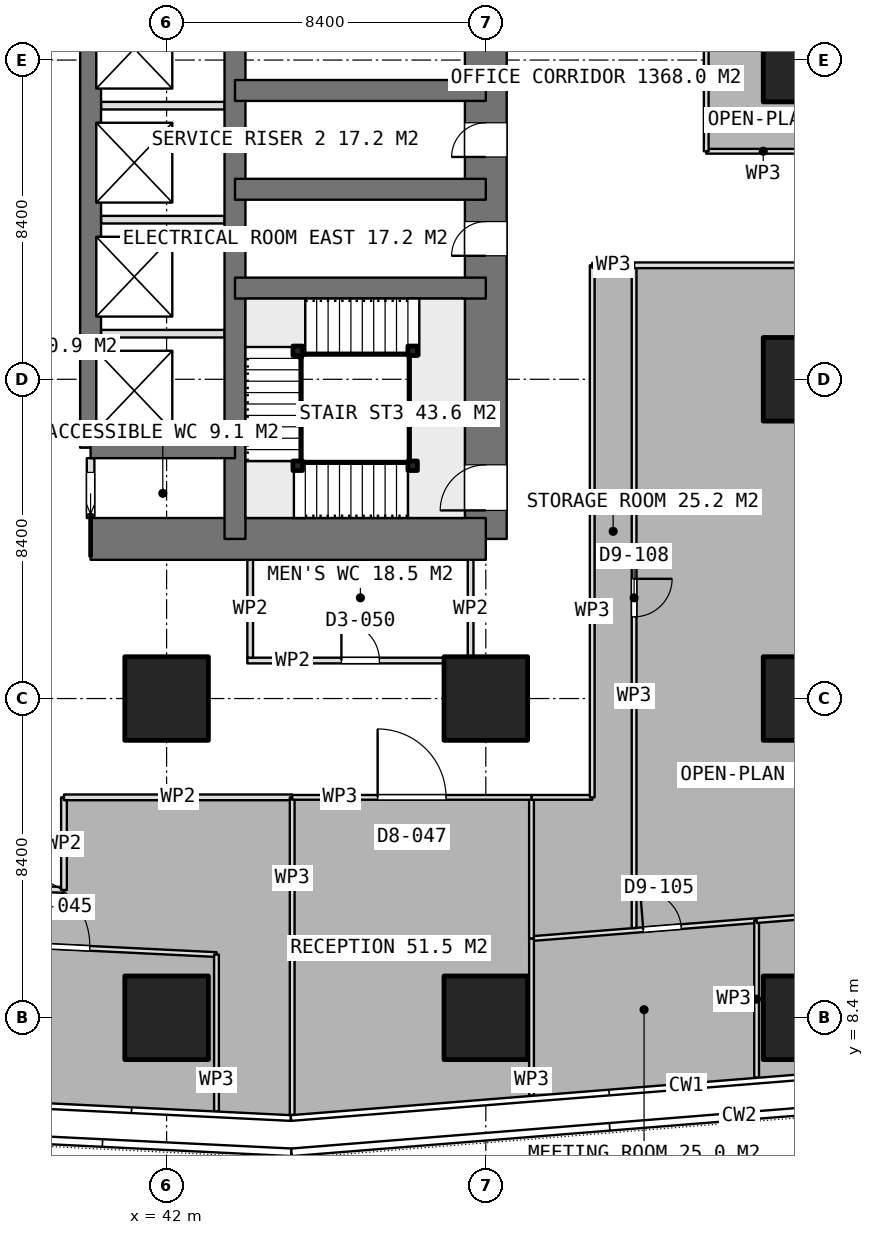
"""IFC4 building model, lengths in metres.
Left out: names, types, materials, properties, quantities, classifications, styles, units other than length and angle.
Written with IfcOpenShell. Run it as: python <this file> out.ifc"""

import sys

from ifc_helpers import new_model, si_unit, direction, frame, frame_2d, origin, origin_2d, place, context, subcontext, project, spatial, rectangle, extrude, element, fill, save


model = new_model("IFC4")
c1 = context("Model", 3, precision=1e-05, world=origin(), true_north=direction((0.0, 1.0)))
c2 = subcontext(c1, "Body", "Model", "MODEL_VIEW")
j1 = project(units=[si_unit("LENGTHUNIT", "METRE"), si_unit("PLANEANGLEUNIT", "RADIAN")], contexts=[c1])
p1 = place(None, origin())
s1 = spatial("IfcSite", under=j1, at=p1, CompositionType="ELEMENT")
p2 = place(p1, origin())
s2 = spatial("IfcBuilding", under=s1, at=p2, CompositionType="ELEMENT")
p3 = place(p2, frame((0.0, 0.0, 44.15)))
s3 = spatial("IfcBuildingStorey", under=s2, at=p3, CompositionType="ELEMENT", Elevation=44.15)
p4 = place(p3, frame((40.0, 21.0, 0.0), z_axis=(0.0, 0.0, 1.0), x_axis=(1.0, 0.0, 0.0)))
e1 = element("IfcWall", 1, at=p4, inside=s3, PredefinedType="SHEAR", context=c2, shape_type="SweptSolid", body=[
    extrude(rectangle(XDim=10.4, YDim=1.1, at=frame_2d((5.2, 0.0))), origin(), (0.0, 0.0, 1.0), 3.75),
])
p5 = place(p3, frame((50.4, 21.0, 0.0), z_axis=(0.0, 0.0, 1.0), x_axis=(0.0, 1.0, 0.0)))
e2 = element("IfcWall", 2, at=p5, inside=s3, PredefinedType="SHEAR", context=c2, shape_type="SweptSolid", body=[
    extrude(rectangle(XDim=25.2, YDim=1.1, at=frame_2d((12.6, 0.0))), origin(), (0.0, 0.0, 1.0), 3.75),
])
p6 = place(p5, frame((16.2, 0.0, 0.0)))
e3 = element("IfcOpeningElement", 3, at=p6, cuts=e2, PredefinedType="OPENING", context=c2, shape_type="SweptSolid", body=[
    extrude(rectangle(XDim=1.2, YDim=2.1, at=frame_2d((0.6, 1.05))), frame((0.0, 0.56, 0.0), z_axis=(0.0, -1.0, 0.0), x_axis=(1.0, 0.0, 0.0)), (0.0, 0.0, 1.0), 1.12),
])
p7 = place(p5, frame((10.05, 0.0, 0.0)))
e4 = element("IfcOpeningElement", 4, at=p7, cuts=e2, PredefinedType="OPENING", context=c2, shape_type="SweptSolid", body=[
    extrude(rectangle(XDim=0.9, YDim=2.1, at=frame_2d((0.45, 1.05))), frame((0.0, 0.56, 0.0), z_axis=(0.0, -1.0, 0.0), x_axis=(1.0, 0.0, 0.0)), (0.0, 0.0, 1.0), 1.12),
])
p8 = place(p5, frame((7.45, 0.0, 0.0)))
e5 = element("IfcOpeningElement", 5, at=p8, cuts=e2, PredefinedType="OPENING", context=c2, shape_type="SweptSolid", body=[
    extrude(rectangle(XDim=0.9, YDim=2.1, at=frame_2d((0.45, 1.05))), frame((0.0, 0.56, 0.0), z_axis=(0.0, -1.0, 0.0), x_axis=(1.0, 0.0, 0.0)), (0.0, 0.0, 1.0), 1.12),
])
p9 = place(p5, frame((0.75, 0.0, 0.0)))
e6 = element("IfcOpeningElement", 6, at=p9, cuts=e2, PredefinedType="OPENING", context=c2, shape_type="SweptSolid", body=[
    extrude(rectangle(XDim=1.2, YDim=2.1, at=frame_2d((0.6, 1.05))), frame((0.0, 0.56, 0.0), z_axis=(0.0, -1.0, 0.0), x_axis=(1.0, 0.0, 0.0)), (0.0, 0.0, 1.0), 1.12),
])
p10 = place(p3, frame((43.8, 21.0, 0.0), z_axis=(0.0, 0.0, 1.0), x_axis=(0.0, 1.0, 0.0)))
e7 = element("IfcWall", 7, at=p10, inside=s3, PredefinedType="SHEAR", context=c2, shape_type="SweptSolid", body=[
    extrude(rectangle(XDim=25.2, YDim=0.55, at=frame_2d((12.6, 0.0))), origin(), (0.0, 0.0, 1.0), 3.75),
])
p11 = place(p3, frame((40.0, 23.4, 0.0), z_axis=(0.0, 0.0, 1.0), x_axis=(0.0, 1.0, 0.0)))
e8 = element("IfcWall", 8, at=p11, inside=s3, PredefinedType="SHEAR", context=c2, shape_type="SweptSolid", body=[
    extrude(rectangle(XDim=18.0, YDim=0.55, at=frame_2d((9.0, 0.0))), origin(), (0.0, 0.0, 1.0), 3.75),
])
p12 = place(p3, frame((40.0, 23.4, 0.0), z_axis=(0.0, 0.0, 1.0), x_axis=(1.0, 0.0, 0.0)))
e9 = element("IfcWall", 9, at=p12, inside=s3, PredefinedType="SHEAR", context=c2, shape_type="SweptSolid", body=[
    extrude(rectangle(XDim=3.8, YDim=0.55, at=frame_2d((1.9, 0.0))), origin(), (0.0, 0.0, 1.0), 3.75),
])
for number, where, z_axis, x_axis in (
    (10, (43.8, 27.6, 0.0), (0.0, 0.0, 1.0), (1.0, 0.0, 0.0)),
    (11, (43.8, 30.2, 0.0), (0.0, 0.0, 1.0), (1.0, 0.0, 0.0)),
    (12, (43.8, 32.8, 0.0), (0.0, 0.0, 1.0), (1.0, 0.0, 0.0)),
):
    element("IfcWall", number, at=place(p3, frame(where, z_axis=z_axis, x_axis=x_axis)), inside=s3, PredefinedType="SHEAR", context=c2, shape_type="SweptSolid", body=[
        extrude(rectangle(XDim=6.6, YDim=0.55, at=frame_2d((3.3, 0.0))), origin(), (0.0, 0.0, 1.0), 3.75),
    ])
for number, where, z_axis, x_axis in (
    (13, (42.0, 8.4, 0.0), (0.0, 0.0, 1.0), (1.0, 0.0, 0.0)),
    (14, (42.0, 16.8, 0.0), (0.0, 0.0, 1.0), (1.0, 0.0, 0.0)),
    (15, (50.4, 8.4, 0.0), (0.0, 0.0, 1.0), (1.0, 0.0, 0.0)),
    (16, (50.4, 16.8, 0.0), (0.0, 0.0, 1.0), (1.0, 0.0, 0.0)),
    (17, (58.8, 8.4, 0.0), (0.0, 0.0, 1.0), (1.0, 0.0, 0.0)),
    (18, (58.8, 16.8, 0.0), (0.0, 0.0, 1.0), (1.0, 0.0, 0.0)),
    (19, (58.8, 25.2, 0.0), (0.0, 0.0, 1.0), (1.0, 0.0, 0.0)),
    (20, (58.8, 33.6, 0.0), (0.0, 0.0, 1.0), (1.0, 0.0, 0.0)),
):
    element("IfcColumn", number, at=place(p3, frame(where, z_axis=z_axis, x_axis=x_axis)), inside=s3, PredefinedType="COLUMN", context=c2, shape_type="SweptSolid", body=[
        extrude(rectangle(XDim=2.2, YDim=2.2, at=origin_2d()), origin(), (0.0, 0.0, 1.0), 3.75),
    ])
for number, where, z_axis, x_axis in (
    (21, (40.275, 26.4, 0.0), (0.0, 0.0, 1.0), (1.0, 0.0, 0.0)),
    (22, (40.275, 29.4, 0.0), (0.0, 0.0, 1.0), (1.0, 0.0, 0.0)),
    (23, (40.275, 32.4, 0.0), (0.0, 0.0, 1.0), (1.0, 0.0, 0.0)),
):
    element("IfcWall", number, at=place(p3, frame(where, z_axis=z_axis, x_axis=x_axis)), inside=s3, PredefinedType="PARTITIONING", context=c2, shape_type="SweptSolid", body=[
        extrude(rectangle(XDim=3.25, YDim=0.2, at=frame_2d((1.625, 0.0))), origin(), (0.0, 0.0, 1.0), 3.5),
    ])
p13 = place(p3, frame((40.0, 21.55, 0.0), z_axis=(0.0, 0.0, 1.0), x_axis=(0.0, 1.0, 0.0)))
e24 = element("IfcWall", 24, at=p13, inside=s3, PredefinedType="PARTITIONING", context=c2, shape_type="SweptSolid", body=[
    extrude(rectangle(XDim=1.575, YDim=0.2, at=frame_2d((0.788, 0.0))), origin(), (0.0, 0.0, 1.0), 3.5),
])
p14 = place(p13, frame((0.1, 0.0, 0.0)))
e25 = element("IfcOpeningElement", 25, at=p14, cuts=e24, PredefinedType="OPENING", context=c2, shape_type="SweptSolid", body=[
    extrude(rectangle(XDim=1.1, YDim=2.1, at=frame_2d((0.55, 1.05))), frame((0.0, 0.11, 0.0), z_axis=(0.0, -1.0, 0.0), x_axis=(1.0, 0.0, 0.0)), (0.0, 0.0, 1.0), 0.22),
])
p15 = place(p3, frame((44.125, 17.8, 0.0), z_axis=(0.0, 0.0, 1.0), x_axis=(1.0, 0.0, 0.0)))
e26 = element("IfcWall", 26, at=p15, inside=s3, PredefinedType="PARTITIONING", context=c2, shape_type="SweptSolid", body=[
    extrude(rectangle(XDim=5.95, YDim=0.15, at=frame_2d((2.975, 0.0))), origin(), (0.0, 0.0, 1.0), 3.5),
])
p16 = place(p15, frame((2.475, 0.0, 0.0)))
e27 = element("IfcOpeningElement", 27, at=p16, cuts=e26, PredefinedType="OPENING", context=c2, shape_type="SweptSolid", body=[
    extrude(rectangle(XDim=1.0, YDim=2.1, at=frame_2d((0.5, 1.05))), frame((0.0, 0.085, 0.0), z_axis=(0.0, -1.0, 0.0), x_axis=(1.0, 0.0, 0.0)), (0.0, 0.0, 1.0), 0.17),
])
for number, where, z_axis, x_axis in (
    (28, (44.2, 17.875, 0.0), (0.0, 0.0, 1.0), (0.0, 1.0, 0.0)),
    (29, (50.0, 17.875, 0.0), (0.0, 0.0, 1.0), (0.0, 1.0, 0.0)),
):
    element("IfcWall", number, at=place(p3, frame(where, z_axis=z_axis, x_axis=x_axis)), inside=s3, PredefinedType="PARTITIONING", context=c2, shape_type="SweptSolid", body=[
        extrude(rectangle(XDim=2.575, YDim=0.15, at=frame_2d((1.288, 0.0))), origin(), (0.0, 0.0, 1.0), 3.5),
    ])
p17 = place(p3, frame((51.603, 10.483, 0.0), z_axis=(0.0, 0.0, 1.0), x_axis=(0.996811357903, 0.079794215047, 0.0)))
e30 = element("IfcWall", 30, at=p17, inside=s3, PredefinedType="PARTITIONING", context=c2, shape_type="SweptSolid", body=[
    extrude(rectangle(XDim=5.942, YDim=0.125, at=frame_2d((2.971, 0.0))), origin(), (0.0, 0.0, 1.0), 3.5),
])
p18 = place(p17, frame((2.95, 0.0, 0.0)))
e31 = element("IfcOpeningElement", 31, at=p18, cuts=e30, PredefinedType="OPENING", context=c2, shape_type="SweptSolid", body=[
    extrude(rectangle(XDim=1.0, YDim=2.1, at=frame_2d((0.5, 1.05))), frame((0.0, 0.073, 0.0), z_axis=(0.0, -1.0, 0.0), x_axis=(1.0, 0.0, 0.0)), (0.0, 0.0, 1.0), 0.145),
])
p19 = place(p3, frame((57.526, 10.957, 0.0), z_axis=(0.0, 0.0, 1.0), x_axis=(0.0, -1.0, 0.0)))
e32 = element("IfcWall", 32, at=p19, inside=s3, PredefinedType="PARTITIONING", context=c2, shape_type="SweptSolid", body=[
    extrude(rectangle(XDim=4.133, YDim=0.125, at=frame_2d((2.066, 0.0))), origin(), (0.0, 0.0, 1.0), 3.5),
])
p20 = place(p3, frame((51.603, 6.349, 0.0), z_axis=(0.0, 0.0, 1.0), x_axis=(0.0, 1.0, 0.0)))
e33 = element("IfcWall", 33, at=p20, inside=s3, PredefinedType="PARTITIONING", context=c2, shape_type="SweptSolid", body=[
    extrude(rectangle(XDim=4.134, YDim=0.125, at=frame_2d((2.067, 0.0))), origin(), (0.0, 0.0, 1.0), 3.5),
])
p21 = place(p3, frame((57.527, 10.957, 0.0), z_axis=(0.0, 0.0, 1.0), x_axis=(0.996798921347, 0.079949424016, 0.0)))
e34 = element("IfcWall", 34, at=p21, inside=s3, PredefinedType="PARTITIONING", context=c2, shape_type="SweptSolid", body=[
    extrude(rectangle(XDim=6.605, YDim=0.125, at=frame_2d((3.303, 0.0))), origin(), (0.0, 0.0, 1.0), 3.5),
])
p22 = place(p3, frame((45.305, 14.2, 0.0), z_axis=(0.0, 0.0, 1.0), x_axis=(1.0, 0.0, 0.0)))
e35 = element("IfcWall", 35, at=p22, inside=s3, PredefinedType="PARTITIONING", context=c2, shape_type="SweptSolid", body=[
    extrude(rectangle(XDim=6.297, YDim=0.125, at=frame_2d((3.148, 0.0))), origin(), (0.0, 0.0, 1.0), 3.5),
])
p23 = place(p22, frame((2.248, 0.0, 0.0)))
e36 = element("IfcOpeningElement", 36, at=p23, cuts=e35, PredefinedType="OPENING", context=c2, shape_type="SweptSolid", body=[
    extrude(rectangle(XDim=1.8, YDim=2.1, at=frame_2d((0.9, 1.05))), frame((0.0, 0.073, 0.0), z_axis=(0.0, -1.0, 0.0), x_axis=(1.0, 0.0, 0.0)), (0.0, 0.0, 1.0), 0.145),
])
p24 = place(p3, frame((51.602, 14.2, 0.0), z_axis=(0.0, 0.0, 1.0), x_axis=(0.0, -1.0, 0.0)))
e37 = element("IfcWall", 37, at=p24, inside=s3, PredefinedType="PARTITIONING", context=c2, shape_type="SweptSolid", body=[
    extrude(rectangle(XDim=3.717, YDim=0.125, at=frame_2d((1.858, 0.0))), origin(), (0.0, 0.0, 1.0), 3.5),
])
p25 = place(p3, frame((45.305, 5.845, 0.0), z_axis=(0.0, 0.0, 1.0), x_axis=(0.0, 1.0, 0.0)))
e38 = element("IfcWall", 38, at=p25, inside=s3, PredefinedType="PARTITIONING", context=c2, shape_type="SweptSolid", body=[
    extrude(rectangle(XDim=4.133, YDim=0.125, at=frame_2d((2.066, 0.0))), origin(), (0.0, 0.0, 1.0), 3.5),
])
p26 = place(p3, frame((45.305, 9.978, 0.0), z_axis=(0.0, 0.0, 1.0), x_axis=(0.0, 1.0, 0.0)))
e39 = element("IfcWall", 39, at=p26, inside=s3, PredefinedType="PARTITIONING", context=c2, shape_type="SweptSolid", body=[
    extrude(rectangle(XDim=4.222, YDim=0.125, at=frame_2d((2.111, 0.0))), origin(), (0.0, 0.0, 1.0), 3.5),
])
p27 = place(p3, frame((51.602, 14.2, 0.0), z_axis=(0.0, 0.0, 1.0), x_axis=(1.0, 0.0, 0.0)))
e40 = element("IfcWall", 40, at=p27, inside=s3, PredefinedType="PARTITIONING", context=c2, shape_type="SweptSolid", body=[
    extrude(rectangle(XDim=1.598, YDim=0.125, at=frame_2d((0.799, 0.0))), origin(), (0.0, 0.0, 1.0), 3.5),
])
p28 = place(p3, frame((53.2, 14.2, 0.0), z_axis=(0.0, 0.0, 1.0), x_axis=(0.0, 1.0, 0.0)))
e41 = element("IfcWall", 41, at=p28, inside=s3, PredefinedType="PARTITIONING", context=c2, shape_type="SweptSolid", body=[
    extrude(rectangle(XDim=14.0, YDim=0.125, at=frame_2d((7.0, 0.0))), origin(), (0.0, 0.0, 1.0), 3.5),
])
p29 = place(p3, frame((53.2, 28.2, 0.0), z_axis=(0.0, 0.0, 1.0), x_axis=(1.0, 0.0, 0.0)))
e42 = element("IfcWall", 42, at=p29, inside=s3, PredefinedType="PARTITIONING", context=c2, shape_type="SweptSolid", body=[
    extrude(rectangle(XDim=1.102, YDim=0.125, at=frame_2d((0.551, 0.0))), origin(), (0.0, 0.0, 1.0), 3.5),
])
p30 = place(p3, frame((54.302, 28.2, 0.0), z_axis=(0.0, 0.0, 1.0), x_axis=(0.0, -1.0, 0.0)))
e43 = element("IfcWall", 43, at=p30, inside=s3, PredefinedType="PARTITIONING", context=c2, shape_type="SweptSolid", body=[
    extrude(rectangle(XDim=17.438, YDim=0.125, at=frame_2d((8.719, 0.0))), origin(), (0.0, 0.0, 1.0), 3.5),
])
p31 = place(p30, frame((8.25, 0.0, 0.0)))
e44 = element("IfcOpeningElement", 44, at=p31, cuts=e43, PredefinedType="OPENING", context=c2, shape_type="SweptSolid", body=[
    extrude(rectangle(XDim=1.0, YDim=2.1, at=frame_2d((0.5, 1.05))), frame((0.0, 0.073, 0.0), z_axis=(0.0, -1.0, 0.0), x_axis=(1.0, 0.0, 0.0)), (0.0, 0.0, 1.0), 0.145),
])
p32 = place(p3, frame((54.302, 28.2, 0.0), z_axis=(0.0, 0.0, 1.0), x_axis=(1.0, 0.0, 0.0)))
e45 = element("IfcWall", 45, at=p32, inside=s3, PredefinedType="PARTITIONING", context=c2, shape_type="SweptSolid", body=[
    extrude(rectangle(XDim=14.972, YDim=0.15, at=frame_2d((7.486, 0.0))), origin(), (0.0, 0.0, 1.0), 3.5),
])
p33 = place(p32, frame((6.971, 0.0, 0.0)))
e46 = element("IfcOpeningElement", 46, at=p33, cuts=e45, PredefinedType="OPENING", context=c2, shape_type="SweptSolid", body=[
    extrude(rectangle(XDim=1.0, YDim=2.1, at=frame_2d((0.5, 1.05))), frame((0.0, 0.085, 0.0), z_axis=(0.0, -1.0, 0.0), x_axis=(1.0, 0.0, 0.0)), (0.0, 0.0, 1.0), 0.17),
])
p34 = place(p3, frame((59.2, 31.2, 0.0), z_axis=(0.0, 0.0, 1.0), x_axis=(-1.0, 0.0, 0.0)))
e47 = element("IfcWall", 47, at=p34, inside=s3, PredefinedType="PARTITIONING", context=c2, shape_type="SweptSolid", body=[
    extrude(rectangle(XDim=3.0, YDim=0.125, at=frame_2d((1.5, 0.0))), origin(), (0.0, 0.0, 1.0), 3.5),
])
p35 = place(p3, frame((56.2, 31.2, 0.0), z_axis=(0.0, 0.0, 1.0), x_axis=(0.0, 1.0, 0.0)))
e48 = element("IfcWall", 48, at=p35, inside=s3, PredefinedType="PARTITIONING", context=c2, shape_type="SweptSolid", body=[
    extrude(rectangle(XDim=4.6, YDim=0.125, at=frame_2d((2.3, 0.0))), origin(), (0.0, 0.0, 1.0), 3.5),
])
p36 = place(p3, frame((34.84, 10.479, 0.0), z_axis=(0.0, 0.0, 1.0), x_axis=(0.998796791982, -0.049040476402, 0.0)))
e49 = element("IfcWall", 49, at=p36, inside=s3, PredefinedType="PARTITIONING", context=c2, shape_type="SweptSolid", body=[
    extrude(rectangle(XDim=8.483, YDim=0.125, at=frame_2d((4.242, 0.0))), origin(), (0.0, 0.0, 1.0), 3.5),
])
p37 = place(p36, frame((3.342, 0.0, 0.0)))
e50 = element("IfcOpeningElement", 50, at=p37, cuts=e49, PredefinedType="OPENING", context=c2, shape_type="SweptSolid", body=[
    extrude(rectangle(XDim=1.8, YDim=2.1, at=frame_2d((0.9, 1.05))), frame((0.0, 0.073, 0.0), z_axis=(0.0, -1.0, 0.0), x_axis=(1.0, 0.0, 0.0)), (0.0, 0.0, 1.0), 0.145),
])
p38 = place(p3, frame((43.313, 10.063, 0.0), z_axis=(0.0, 0.0, 1.0), x_axis=(0.0, -1.0, 0.0)))
e51 = element("IfcWall", 51, at=p38, inside=s3, PredefinedType="PARTITIONING", context=c2, shape_type="SweptSolid", body=[
    extrude(rectangle(XDim=4.125, YDim=0.125, at=frame_2d((2.062, 0.0))), origin(), (0.0, 0.0, 1.0), 3.5),
])
p39 = place(p3, frame((36.3, 11.909, 0.0), z_axis=(0.0, 0.0, 1.0), x_axis=(0.998802102454, -0.048932199355, 0.0)))
e52 = element("IfcWall", 52, at=p39, inside=s3, PredefinedType="PARTITIONING", context=c2, shape_type="SweptSolid", body=[
    extrude(rectangle(XDim=3.004, YDim=0.15, at=frame_2d((1.502, 0.0))), origin(), (0.0, 0.0, 1.0), 3.5),
])
p40 = place(p3, frame((39.3, 11.762, 0.0), z_axis=(0.0, 0.0, 1.0), x_axis=(0.0, 1.0, 0.0)))
e53 = element("IfcWall", 53, at=p40, inside=s3, PredefinedType="PARTITIONING", context=c2, shape_type="SweptSolid", body=[
    extrude(rectangle(XDim=2.438, YDim=0.15, at=frame_2d((1.219, 0.0))), origin(), (0.0, 0.0, 1.0), 3.5),
])
p41 = place(p3, frame((39.3, 14.2, 0.0), z_axis=(0.0, 0.0, 1.0), x_axis=(1.0, 0.0, 0.0)))
e54 = element("IfcWall", 54, at=p41, inside=s3, PredefinedType="PARTITIONING", context=c2, shape_type="SweptSolid", body=[
    extrude(rectangle(XDim=6.004, YDim=0.15, at=frame_2d((3.002, 0.0))), origin(), (0.0, 0.0, 1.0), 3.5),
])
for number, where, z_axis, x_axis in (
    (55, (48.475, 22.925, 0.0), (0.0, 0.0, 1.0), (1.0, 0.0, 0.0)),
    (56, (45.45, 22.925, 0.0), (0.0, 0.0, 1.0), (1.0, 0.0, 0.0)),
    (57, (45.45, 25.95, 0.0), (0.0, 0.0, 1.0), (1.0, 0.0, 0.0)),
    (58, (48.475, 25.95, 0.0), (0.0, 0.0, 1.0), (1.0, 0.0, 0.0)),
):
    element("IfcColumn", number, at=place(p3, frame(where, z_axis=z_axis, x_axis=x_axis)), inside=s3, PredefinedType="COLUMN", context=c2, shape_type="SweptSolid", body=[
        extrude(rectangle(XDim=0.25, YDim=0.25, at=origin_2d()), origin(), (0.0, 0.0, 1.0), 3.75),
    ])
p42 = place(p7, origin())
e59 = element("IfcDoor", 59, at=p42, inside=s3, OperationType="SINGLE_SWING_LEFT", PredefinedType="DOOR", context=c2, shape_type="SweptSolid", body=[
    extrude(rectangle(XDim=0.9, YDim=2.1, at=frame_2d((0.45, 1.05))), frame((0.0, 0.025, 0.0), z_axis=(0.0, -1.0, 0.0), x_axis=(1.0, 0.0, 0.0)), (0.0, 0.0, 1.0), 0.05),
])
fill(e4, e59)
p43 = place(p8, origin())
e60 = element("IfcDoor", 60, at=p43, inside=s3, OperationType="SINGLE_SWING_LEFT", PredefinedType="DOOR", context=c2, shape_type="SweptSolid", body=[
    extrude(rectangle(XDim=0.9, YDim=2.1, at=frame_2d((0.45, 1.05))), frame((0.0, 0.025, 0.0), z_axis=(0.0, -1.0, 0.0), x_axis=(1.0, 0.0, 0.0)), (0.0, 0.0, 1.0), 0.05),
])
fill(e5, e60)
p44 = place(p14, origin())
e61 = element("IfcDoor", 61, at=p44, inside=s3, OperationType="SLIDING_TO_LEFT", PredefinedType="DOOR", context=c2, shape_type="SweptSolid", body=[
    extrude(rectangle(XDim=1.1, YDim=2.1, at=frame_2d((0.55, 1.05))), frame((0.0, 0.025, 0.0), z_axis=(0.0, -1.0, 0.0), x_axis=(1.0, 0.0, 0.0)), (0.0, 0.0, 1.0), 0.05),
])
fill(e25, e61)
p45 = place(p16, origin())
e62 = element("IfcDoor", 62, at=p45, inside=s3, OperationType="SINGLE_SWING_LEFT", PredefinedType="DOOR", context=c2, shape_type="SweptSolid", body=[
    extrude(rectangle(XDim=1.0, YDim=2.1, at=frame_2d((0.5, 1.05))), frame((0.0, 0.025, 0.0), z_axis=(0.0, -1.0, 0.0), x_axis=(1.0, 0.0, 0.0)), (0.0, 0.0, 1.0), 0.05),
])
fill(e27, e62)
p46 = place(p18, origin())
e63 = element("IfcDoor", 63, at=p46, inside=s3, OperationType="SINGLE_SWING_LEFT", PredefinedType="DOOR", context=c2, shape_type="SweptSolid", body=[
    extrude(rectangle(XDim=1.0, YDim=2.1, at=frame_2d((0.5, 1.05))), frame((0.0, 0.025, 0.0), z_axis=(0.0, -1.0, 0.0), x_axis=(1.0, 0.0, 0.0)), (0.0, 0.0, 1.0), 0.05),
])
fill(e31, e63)
p47 = place(p23, origin())
e64 = element("IfcDoor", 64, at=p47, inside=s3, OperationType="DOUBLE_DOOR_SINGLE_SWING", PredefinedType="DOOR", context=c2, shape_type="SweptSolid", body=[
    extrude(rectangle(XDim=1.8, YDim=2.1, at=frame_2d((0.9, 1.05))), frame((0.0, 0.025, 0.0), z_axis=(0.0, -1.0, 0.0), x_axis=(1.0, 0.0, 0.0)), (0.0, 0.0, 1.0), 0.05),
])
fill(e36, e64)
p48 = place(p31, origin())
e65 = element("IfcDoor", 65, at=p48, inside=s3, OperationType="SINGLE_SWING_LEFT", PredefinedType="DOOR", context=c2, shape_type="SweptSolid", body=[
    extrude(rectangle(XDim=1.0, YDim=2.1, at=frame_2d((0.5, 1.05))), frame((0.0, 0.025, 0.0), z_axis=(0.0, -1.0, 0.0), x_axis=(1.0, 0.0, 0.0)), (0.0, 0.0, 1.0), 0.05),
])
fill(e44, e65)
p49 = place(p37, origin())
e66 = element("IfcDoor", 66, at=p49, inside=s3, OperationType="DOUBLE_DOOR_SINGLE_SWING", PredefinedType="DOOR", context=c2, shape_type="SweptSolid", body=[
    extrude(rectangle(XDim=1.8, YDim=2.1, at=frame_2d((0.9, 1.05))), frame((0.0, 0.025, 0.0), z_axis=(0.0, -1.0, 0.0), x_axis=(1.0, 0.0, 0.0)), (0.0, 0.0, 1.0), 0.05),
])
fill(e50, e66)
p50 = place(p9, origin())
e67 = element("IfcDoor", 67, at=p50, inside=s3, OperationType="SINGLE_SWING_RIGHT", PredefinedType="DOOR", context=c2, shape_type="SweptSolid", body=[
    extrude(rectangle(XDim=1.2, YDim=2.1, at=frame_2d((0.6, 1.05))), frame((0.0, 0.025, 0.0), z_axis=(0.0, -1.0, 0.0), x_axis=(1.0, 0.0, 0.0)), (0.0, 0.0, 1.0), 0.05),
])
fill(e6, e67)
save(model, sys.argv[1])
